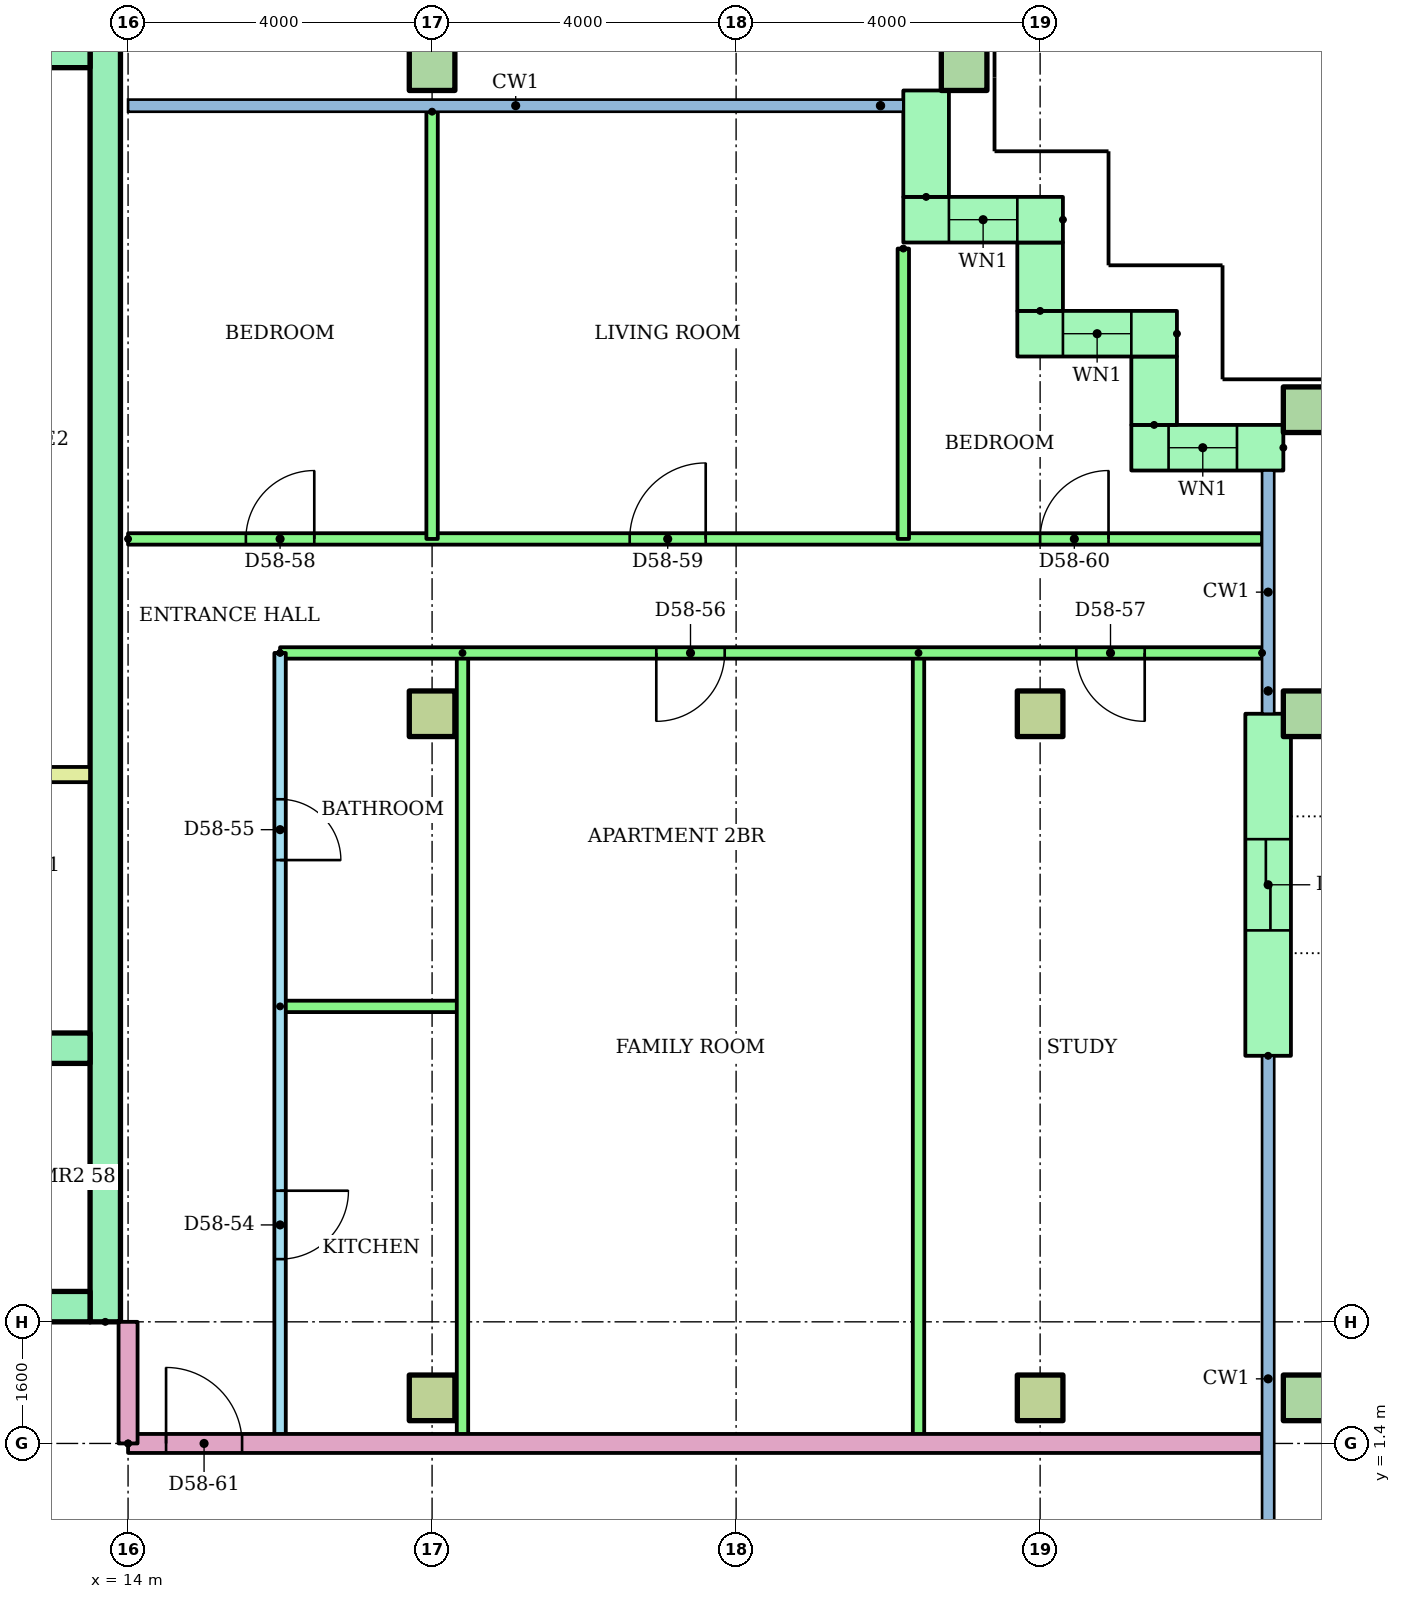
"""IFC4 building model, lengths in metres.
Left out: names, types, materials, properties, quantities, classifications, styles, units other than length and angle.
Written with IfcOpenShell. Run it as: python <this file> out.ifc"""

import sys

from ifc_helpers import new_model, si_unit, direction, frame, frame_2d, origin, origin_2d, place, context, subcontext, project, spatial, rectangle, hollow_rectangle, extrude, element, fill, save


model = new_model("IFC4")
c1 = context("Model", 3, precision=1e-05, world=origin(), true_north=direction((0.0, 1.0)))
c2 = subcontext(c1, "Body", "Model", "MODEL_VIEW")
j1 = project(units=[si_unit("LENGTHUNIT", "METRE"), si_unit("PLANEANGLEUNIT", "RADIAN")], contexts=[c1])
p1 = place(None, origin())
s1 = spatial("IfcSite", under=j1, at=p1, CompositionType="ELEMENT")
p2 = place(p1, origin())
s2 = spatial("IfcBuilding", under=s1, at=p2, CompositionType="ELEMENT")
p3 = place(p2, frame((0.0, 0.0, 223.6)))
s3 = spatial("IfcBuildingStorey", under=s2, at=p3, CompositionType="ELEMENT", Elevation=223.6)
for number, where in (
    (1, (18.0, 2.0, 0.0)),
    (2, (26.0, 2.0, 0.0)),
):
    element("IfcColumn", number, at=place(p3, frame(where)), inside=s3, PredefinedType="COLUMN", context=c2, shape_type="SweptSolid", body=[
        extrude(rectangle(XDim=0.6, YDim=0.6, at=origin_2d()), origin(), (0.0, 0.0, 1.0), 3.2),
    ])
p4 = place(p3, frame((29.5, 2.0, 0.0)))
e3 = element("IfcColumn", 3, at=p4, inside=s3, PredefinedType="COLUMN", context=c2, shape_type="SweptSolid", body=[
    extrude(hollow_rectangle(XDim=0.6, YDim=0.6, WallThickness=0.03, at=origin_2d()), origin(), (0.0, 0.0, 1.0), 3.2),
])
for number, where in (
    (4, (18.0, 11.0, 0.0)),
    (5, (26.0, 11.0, 0.0)),
):
    element("IfcColumn", number, at=place(p3, frame(where)), inside=s3, PredefinedType="COLUMN", context=c2, shape_type="SweptSolid", body=[
        extrude(rectangle(XDim=0.6, YDim=0.6, at=origin_2d()), origin(), (0.0, 0.0, 1.0), 3.2),
    ])
for number, where in (
    (6, (29.5, 11.0, 0.0)),
    (7, (29.5, 15.0, 0.0)),
    (8, (18.0, 19.5, 0.0)),
    (9, (25.0, 19.5, 0.0)),
):
    element("IfcColumn", number, at=place(p3, frame(where)), inside=s3, PredefinedType="COLUMN", context=c2, shape_type="SweptSolid", body=[
        extrude(hollow_rectangle(XDim=0.6, YDim=0.6, WallThickness=0.03, at=origin_2d()), origin(), (0.0, 0.0, 1.0), 3.2),
    ])
p5 = place(p3, frame((29.2, 14.5, 0.0), z_axis=(0.0, 0.0, 1.0), x_axis=(-1.0, 0.0, 0.0)))
e10 = element("IfcWall", 10, at=p5, inside=s3, PredefinedType="STANDARD", context=c2, shape_type="SweptSolid", body=[
    extrude(rectangle(XDim=2.0, YDim=0.6, at=frame_2d((1.0, 0.0))), origin(), (0.0, 0.0, 1.0), 2.92),
])
p6 = place(p5, frame((0.61, 0.0, 0.9)))
e11 = element("IfcOpeningElement", 11, at=p6, cuts=e10, PredefinedType="OPENING", context=c2, shape_type="SweptSolid", body=[
    extrude(rectangle(XDim=0.9, YDim=1.5, at=frame_2d((0.45, 0.75))), frame((0.0, 0.31, 0.0), z_axis=(0.0, -1.0, 0.0), x_axis=(1.0, 0.0, 0.0)), (0.0, 0.0, 1.0), 0.62),
])
p7 = place(p3, frame((27.5, 14.8, 0.0), z_axis=(0.0, 0.0, 1.0), x_axis=(0.0, 1.0, 0.0)))
e12 = element("IfcWall", 12, at=p7, inside=s3, PredefinedType="STANDARD", context=c2, shape_type="SweptSolid", body=[
    extrude(rectangle(XDim=0.9, YDim=0.6, at=frame_2d((0.45, 0.0))), origin(), (0.0, 0.0, 1.0), 2.92),
])
p8 = place(p3, frame((27.8, 16.0, 0.0), z_axis=(0.0, 0.0, 1.0), x_axis=(-1.0, 0.0, 0.0)))
e13 = element("IfcWall", 13, at=p8, inside=s3, PredefinedType="STANDARD", context=c2, shape_type="SweptSolid", body=[
    extrude(rectangle(XDim=2.1, YDim=0.6, at=frame_2d((1.05, 0.0))), origin(), (0.0, 0.0, 1.0), 2.92),
])
p9 = place(p8, frame((0.6, 0.0, 0.9)))
e14 = element("IfcOpeningElement", 14, at=p9, cuts=e13, PredefinedType="OPENING", context=c2, shape_type="SweptSolid", body=[
    extrude(rectangle(XDim=0.9, YDim=1.5, at=frame_2d((0.45, 0.75))), frame((0.0, 0.31, 0.0), z_axis=(0.0, -1.0, 0.0), x_axis=(1.0, 0.0, 0.0)), (0.0, 0.0, 1.0), 0.62),
])
p10 = place(p3, frame((26.0, 16.3, 0.0), z_axis=(0.0, 0.0, 1.0), x_axis=(0.0, 1.0, 0.0)))
e15 = element("IfcWall", 15, at=p10, inside=s3, PredefinedType="STANDARD", context=c2, shape_type="SweptSolid", body=[
    extrude(rectangle(XDim=0.9, YDim=0.6, at=frame_2d((0.45, 0.0))), origin(), (0.0, 0.0, 1.0), 2.92),
])
p11 = place(p3, frame((26.3, 17.5, 0.0), z_axis=(0.0, 0.0, 1.0), x_axis=(-1.0, 0.0, 0.0)))
e16 = element("IfcWall", 16, at=p11, inside=s3, PredefinedType="STANDARD", context=c2, shape_type="SweptSolid", body=[
    extrude(rectangle(XDim=2.1, YDim=0.6, at=frame_2d((1.05, 0.0))), origin(), (0.0, 0.0, 1.0), 2.92),
])
p12 = place(p11, frame((0.6, 0.0, 0.9)))
e17 = element("IfcOpeningElement", 17, at=p12, cuts=e16, PredefinedType="OPENING", context=c2, shape_type="SweptSolid", body=[
    extrude(rectangle(XDim=0.9, YDim=1.5, at=frame_2d((0.45, 0.75))), frame((0.0, 0.31, 0.0), z_axis=(0.0, -1.0, 0.0), x_axis=(1.0, 0.0, 0.0)), (0.0, 0.0, 1.0), 0.62),
])
p13 = place(p3, frame((24.5, 17.8, 0.0), z_axis=(0.0, 0.0, 1.0), x_axis=(0.0, 1.0, 0.0)))
e18 = element("IfcWall", 18, at=p13, inside=s3, PredefinedType="STANDARD", context=c2, shape_type="SweptSolid", body=[
    extrude(rectangle(XDim=1.4, YDim=0.6, at=frame_2d((0.7, 0.0))), origin(), (0.0, 0.0, 1.0), 2.92),
])
p14 = place(p3, frame((29.0, 6.5, 0.0), z_axis=(0.0, 0.0, 1.0), x_axis=(0.0, 1.0, 0.0)))
e19 = element("IfcWall", 19, at=p14, inside=s3, PredefinedType="STANDARD", context=c2, shape_type="SweptSolid", body=[
    extrude(rectangle(XDim=4.5, YDim=0.6, at=frame_2d((2.25, 0.0))), origin(), (0.0, 0.0, 1.0), 2.92),
])
p15 = place(p14, frame((1.65, 0.0, 0.0)))
e20 = element("IfcOpeningElement", 20, at=p15, cuts=e19, PredefinedType="OPENING", context=c2, shape_type="SweptSolid", body=[
    extrude(rectangle(XDim=1.2, YDim=2.1, at=frame_2d((0.6, 1.05))), frame((0.0, 0.31, 0.0), z_axis=(0.0, -1.0, 0.0), x_axis=(1.0, 0.0, 0.0)), (0.0, 0.0, 1.0), 0.62),
])
p16 = place(p3, frame((13.7, 3.0, 0.0), z_axis=(0.0, 0.0, 1.0), x_axis=(0.0, 1.0, 0.0)))
e21 = element("IfcWall", 21, at=p16, inside=s3, PredefinedType="SHEAR", context=c2, shape_type="SweptSolid", body=[
    extrude(rectangle(XDim=17.0, YDim=0.4, at=frame_2d((8.5, 0.0))), origin(), (0.0, 0.0, 1.0), 2.92),
])
p17 = place(p3, frame((-13.5, 19.7, 0.0)))
e22 = element("IfcWall", 22, at=p17, inside=s3, PredefinedType="SHEAR", context=c2, shape_type="SweptSolid", body=[
    extrude(rectangle(XDim=27.0, YDim=0.4, at=frame_2d((13.5, 0.0))), origin(), (0.0, 0.0, 1.0), 2.92),
])
p18 = place(p3, frame((-13.5, 3.2, 0.0)))
e23 = element("IfcWall", 23, at=p18, inside=s3, PredefinedType="SHEAR", context=c2, shape_type="SweptSolid", body=[
    extrude(rectangle(XDim=27.0, YDim=0.4, at=frame_2d((13.5, 0.0))), origin(), (0.0, 0.0, 1.0), 2.92),
])
p19 = place(p18, frame((22.083, 0.0, 0.0)))
e24 = element("IfcOpeningElement", 24, at=p19, cuts=e23, PredefinedType="OPENING", context=c2, shape_type="SweptSolid", body=[
    extrude(rectangle(XDim=1.1, YDim=2.1, at=frame_2d((0.55, 1.05))), frame((0.0, 0.21, 0.0), z_axis=(0.0, -1.0, 0.0), x_axis=(1.0, 0.0, 0.0)), (0.0, 0.0, 1.0), 0.42),
])
p20 = place(p18, frame((25.128, 0.0, 0.0)))
e25 = element("IfcOpeningElement", 25, at=p20, cuts=e23, PredefinedType="OPENING", context=c2, shape_type="SweptSolid", body=[
    extrude(rectangle(XDim=1.1, YDim=2.1, at=frame_2d((0.55, 1.05))), frame((0.0, 0.21, 0.0), z_axis=(0.0, -1.0, 0.0), x_axis=(1.0, 0.0, 0.0)), (0.0, 0.0, 1.0), 0.42),
])
p21 = place(p18, frame((12.6, 0.0, 0.0)))
e26 = element("IfcOpeningElement", 26, at=p21, cuts=e23, PredefinedType="OPENING", context=c2, shape_type="SweptSolid", body=[
    extrude(rectangle(XDim=1.8, YDim=2.1, at=frame_2d((0.9, 1.05))), frame((0.0, 0.21, 0.0), z_axis=(0.0, -1.0, 0.0), x_axis=(1.0, 0.0, 0.0)), (0.0, 0.0, 1.0), 0.42),
])
p22 = place(p3, frame((1.522, 6.6, 0.0)))
e27 = element("IfcWall", 27, at=p22, inside=s3, PredefinedType="SHEAR", context=c2, shape_type="SweptSolid", body=[
    extrude(rectangle(XDim=11.978, YDim=0.4, at=frame_2d((5.989, 0.0))), origin(), (0.0, 0.0, 1.0), 2.92),
])
p23 = place(p22, frame((1.022, 0.0, 0.0)))
e28 = element("IfcOpeningElement", 28, at=p23, cuts=e27, PredefinedType="OPENING", context=c2, shape_type="SweptSolid", body=[
    extrude(rectangle(XDim=1.0, YDim=2.1, at=frame_2d((0.5, 1.05))), frame((0.0, 0.21, 0.0), z_axis=(0.0, -1.0, 0.0), x_axis=(1.0, 0.0, 0.0)), (0.0, 0.0, 1.0), 0.42),
])
p24 = place(p22, frame((4.067, 0.0, 0.0)))
e29 = element("IfcOpeningElement", 29, at=p24, cuts=e27, PredefinedType="OPENING", context=c2, shape_type="SweptSolid", body=[
    extrude(rectangle(XDim=1.0, YDim=2.1, at=frame_2d((0.5, 1.05))), frame((0.0, 0.21, 0.0), z_axis=(0.0, -1.0, 0.0), x_axis=(1.0, 0.0, 0.0)), (0.0, 0.0, 1.0), 0.42),
])
p25 = place(p3, frame((9.6, 10.2, 0.0)))
e30 = element("IfcWall", 30, at=p25, inside=s3, PredefinedType="PARTITIONING", context=c2, shape_type="SweptSolid", body=[
    extrude(rectangle(XDim=3.9, YDim=0.2, at=frame_2d((1.95, 0.0))), origin(), (0.0, 0.0, 1.0), 2.92),
])
p26 = place(p3, frame((16.0, 11.8, 0.0), z_axis=(0.0, 0.0, 1.0), x_axis=(0.0, -1.0, 0.0)))
e31 = element("IfcWall", 31, at=p26, inside=s3, PredefinedType="PARTITIONING", context=c2, shape_type="SweptSolid", body=[
    extrude(rectangle(XDim=10.4, YDim=0.15, at=frame_2d((5.2, 0.0))), origin(), (0.0, 0.0, 1.0), 2.4),
])
p27 = place(p26, frame((7.075, 0.0, 0.0)))
e32 = element("IfcOpeningElement", 32, at=p27, cuts=e31, PredefinedType="OPENING", context=c2, shape_type="SweptSolid", body=[
    extrude(rectangle(XDim=0.9, YDim=2.1, at=frame_2d((0.45, 1.05))), frame((0.0, 0.085, 0.0), z_axis=(0.0, -1.0, 0.0), x_axis=(1.0, 0.0, 0.0)), (0.0, 0.0, 1.0), 0.17),
])
p28 = place(p26, frame((1.925, 0.0, 0.0)))
e33 = element("IfcOpeningElement", 33, at=p28, cuts=e31, PredefinedType="OPENING", context=c2, shape_type="SweptSolid", body=[
    extrude(rectangle(XDim=0.8, YDim=2.1, at=frame_2d((0.4, 1.05))), frame((0.0, 0.085, 0.0), z_axis=(0.0, -1.0, 0.0), x_axis=(1.0, 0.0, 0.0)), (0.0, 0.0, 1.0), 0.17),
])
p29 = place(p3, frame((16.0, 7.15, 0.0)))
e34 = element("IfcWall", 34, at=p29, inside=s3, PredefinedType="PARTITIONING", context=c2, shape_type="SweptSolid", body=[
    extrude(rectangle(XDim=2.4, YDim=0.15, at=frame_2d((1.2, 0.0))), origin(), (0.0, 0.0, 1.0), 2.4),
])
for number, where, z_axis, x_axis in (
    (35, (18.4, 11.8, 0.0), (0.0, 0.0, 1.0), (0.0, -1.0, 0.0)),
    (36, (24.4, 11.8, 0.0), (0.0, 0.0, 1.0), (0.0, -1.0, 0.0)),
):
    element("IfcWall", number, at=place(p3, frame(where, z_axis=z_axis, x_axis=x_axis)), inside=s3, PredefinedType="PARTITIONING", context=c2, shape_type="SweptSolid", body=[
        extrude(rectangle(XDim=10.4, YDim=0.15, at=frame_2d((5.2, 0.0))), origin(), (0.0, 0.0, 1.0), 2.4),
    ])
p30 = place(p3, frame((28.92, 11.8, 0.0), z_axis=(0.0, 0.0, 1.0), x_axis=(-1.0, 0.0, 0.0)))
e37 = element("IfcWall", 37, at=p30, inside=s3, PredefinedType="PARTITIONING", context=c2, shape_type="SweptSolid", body=[
    extrude(rectangle(XDim=12.92, YDim=0.15, at=frame_2d((6.46, 0.0))), origin(), (0.0, 0.0, 1.0), 2.4),
])
p31 = place(p30, frame((7.07, 0.0, 0.0)))
e38 = element("IfcOpeningElement", 38, at=p31, cuts=e37, PredefinedType="OPENING", context=c2, shape_type="SweptSolid", body=[
    extrude(rectangle(XDim=0.9, YDim=2.1, at=frame_2d((0.45, 1.05))), frame((0.0, 0.085, 0.0), z_axis=(0.0, -1.0, 0.0), x_axis=(1.0, 0.0, 0.0)), (0.0, 0.0, 1.0), 0.17),
])
p32 = place(p30, frame((1.544, 0.0, 0.0)))
e39 = element("IfcOpeningElement", 39, at=p32, cuts=e37, PredefinedType="OPENING", context=c2, shape_type="SweptSolid", body=[
    extrude(rectangle(XDim=0.9, YDim=2.1, at=frame_2d((0.45, 1.05))), frame((0.0, 0.085, 0.0), z_axis=(0.0, -1.0, 0.0), x_axis=(1.0, 0.0, 0.0)), (0.0, 0.0, 1.0), 0.17),
])
p33 = place(p3, frame((14.0, 13.3, 0.0)))
e40 = element("IfcWall", 40, at=p33, inside=s3, PredefinedType="PARTITIONING", context=c2, shape_type="SweptSolid", body=[
    extrude(rectangle(XDim=14.92, YDim=0.15, at=frame_2d((7.46, 0.0))), origin(), (0.0, 0.0, 1.0), 2.4),
])
p34 = place(p33, frame((1.55, 0.0, 0.0)))
e41 = element("IfcOpeningElement", 41, at=p34, cuts=e40, PredefinedType="OPENING", context=c2, shape_type="SweptSolid", body=[
    extrude(rectangle(XDim=0.9, YDim=2.1, at=frame_2d((0.45, 1.05))), frame((0.0, 0.085, 0.0), z_axis=(0.0, -1.0, 0.0), x_axis=(1.0, 0.0, 0.0)), (0.0, 0.0, 1.0), 0.17),
])
p35 = place(p33, frame((6.6, 0.0, 0.0)))
e42 = element("IfcOpeningElement", 42, at=p35, cuts=e40, PredefinedType="OPENING", context=c2, shape_type="SweptSolid", body=[
    extrude(rectangle(XDim=1.0, YDim=2.1, at=frame_2d((0.5, 1.05))), frame((0.0, 0.085, 0.0), z_axis=(0.0, -1.0, 0.0), x_axis=(1.0, 0.0, 0.0)), (0.0, 0.0, 1.0), 0.17),
])
p36 = place(p33, frame((12.0, 0.0, 0.0)))
e43 = element("IfcOpeningElement", 43, at=p36, cuts=e40, PredefinedType="OPENING", context=c2, shape_type="SweptSolid", body=[
    extrude(rectangle(XDim=0.9, YDim=2.1, at=frame_2d((0.45, 1.05))), frame((0.0, 0.085, 0.0), z_axis=(0.0, -1.0, 0.0), x_axis=(1.0, 0.0, 0.0)), (0.0, 0.0, 1.0), 0.17),
])
p37 = place(p3, frame((18.0, 18.921, 0.0), z_axis=(0.0, 0.0, 1.0), x_axis=(0.0, -1.0, 0.0)))
e44 = element("IfcWall", 44, at=p37, inside=s3, PredefinedType="PARTITIONING", context=c2, shape_type="SweptSolid", body=[
    extrude(rectangle(XDim=5.621, YDim=0.15, at=frame_2d((2.811, 0.0))), origin(), (0.0, 0.0, 1.0), 2.4),
])
p38 = place(p3, frame((24.2, 17.12, 0.0), z_axis=(0.0, 0.0, 1.0), x_axis=(0.0, -1.0, 0.0)))
e45 = element("IfcWall", 45, at=p38, inside=s3, PredefinedType="PARTITIONING", context=c2, shape_type="SweptSolid", body=[
    extrude(rectangle(XDim=3.82, YDim=0.15, at=frame_2d((1.91, 0.0))), origin(), (0.0, 0.0, 1.0), 2.4),
])
p39 = place(p3, frame((14.0, 1.4, 0.0)))
e46 = element("IfcWall", 46, at=p39, inside=s3, PredefinedType="PARTITIONING", context=c2, shape_type="SweptSolid", body=[
    extrude(rectangle(XDim=14.92, YDim=0.25, at=frame_2d((7.46, 0.0))), origin(), (0.0, 0.0, 1.0), 2.4),
])
p40 = place(p39, frame((0.5, 0.0, 0.0)))
e47 = element("IfcOpeningElement", 47, at=p40, cuts=e46, PredefinedType="OPENING", context=c2, shape_type="SweptSolid", body=[
    extrude(rectangle(XDim=1.0, YDim=2.1, at=frame_2d((0.5, 1.05))), frame((0.0, 0.135, 0.0), z_axis=(0.0, -1.0, 0.0), x_axis=(1.0, 0.0, 0.0)), (0.0, 0.0, 1.0), 0.27),
])
p41 = place(p3, frame((14.0, 1.4, 0.0), z_axis=(0.0, 0.0, 1.0), x_axis=(0.0, 1.0, 0.0)))
e48 = element("IfcWall", 48, at=p41, inside=s3, PredefinedType="PARTITIONING", context=c2, shape_type="SweptSolid", body=[
    extrude(rectangle(XDim=1.6, YDim=0.25, at=frame_2d((0.8, 0.0))), origin(), (0.0, 0.0, 1.0), 2.4),
])
p42 = place(p6, origin())
e49 = element("IfcWindow", 49, at=p42, inside=s3, PartitioningType="SINGLE_PANEL", PredefinedType="WINDOW", context=c2, shape_type="SweptSolid", body=[
    extrude(rectangle(XDim=0.9, YDim=1.5, at=frame_2d((0.45, 0.75))), frame((0.0, 0.03, 0.0), z_axis=(0.0, -1.0, 0.0), x_axis=(1.0, 0.0, 0.0)), (0.0, 0.0, 1.0), 0.06),
])
fill(e11, e49)
p43 = place(p9, origin())
e50 = element("IfcWindow", 50, at=p43, inside=s3, PartitioningType="SINGLE_PANEL", PredefinedType="WINDOW", context=c2, shape_type="SweptSolid", body=[
    extrude(rectangle(XDim=0.9, YDim=1.5, at=frame_2d((0.45, 0.75))), frame((0.0, 0.03, 0.0), z_axis=(0.0, -1.0, 0.0), x_axis=(1.0, 0.0, 0.0)), (0.0, 0.0, 1.0), 0.06),
])
fill(e14, e50)
p44 = place(p12, origin())
e51 = element("IfcWindow", 51, at=p44, inside=s3, PartitioningType="SINGLE_PANEL", PredefinedType="WINDOW", context=c2, shape_type="SweptSolid", body=[
    extrude(rectangle(XDim=0.9, YDim=1.5, at=frame_2d((0.45, 0.75))), frame((0.0, 0.03, 0.0), z_axis=(0.0, -1.0, 0.0), x_axis=(1.0, 0.0, 0.0)), (0.0, 0.0, 1.0), 0.06),
])
fill(e17, e51)
p45 = place(p27, origin())
e52 = element("IfcDoor", 52, at=p45, inside=s3, OperationType="SINGLE_SWING_LEFT", PredefinedType="DOOR", context=c2, shape_type="SweptSolid", body=[
    extrude(rectangle(XDim=0.9, YDim=2.1, at=frame_2d((0.45, 1.05))), frame((0.0, 0.025, 0.0), z_axis=(0.0, -1.0, 0.0), x_axis=(1.0, 0.0, 0.0)), (0.0, 0.0, 1.0), 0.05),
])
fill(e32, e52)
p46 = place(p28, origin())
e53 = element("IfcDoor", 53, at=p46, inside=s3, OperationType="SINGLE_SWING_RIGHT", PredefinedType="DOOR", context=c2, shape_type="SweptSolid", body=[
    extrude(rectangle(XDim=0.8, YDim=2.1, at=frame_2d((0.4, 1.05))), frame((0.0, 0.025, 0.0), z_axis=(0.0, -1.0, 0.0), x_axis=(1.0, 0.0, 0.0)), (0.0, 0.0, 1.0), 0.05),
])
fill(e33, e53)
p47 = place(p31, origin())
e54 = element("IfcDoor", 54, at=p47, inside=s3, OperationType="SINGLE_SWING_RIGHT", PredefinedType="DOOR", context=c2, shape_type="SweptSolid", body=[
    extrude(rectangle(XDim=0.9, YDim=2.1, at=frame_2d((0.45, 1.05))), frame((0.0, 0.025, 0.0), z_axis=(0.0, -1.0, 0.0), x_axis=(1.0, 0.0, 0.0)), (0.0, 0.0, 1.0), 0.05),
])
fill(e38, e54)
p48 = place(p32, origin())
e55 = element("IfcDoor", 55, at=p48, inside=s3, OperationType="SINGLE_SWING_LEFT", PredefinedType="DOOR", context=c2, shape_type="SweptSolid", body=[
    extrude(rectangle(XDim=0.9, YDim=2.1, at=frame_2d((0.45, 1.05))), frame((0.0, 0.025, 0.0), z_axis=(0.0, -1.0, 0.0), x_axis=(1.0, 0.0, 0.0)), (0.0, 0.0, 1.0), 0.05),
])
fill(e39, e55)
p49 = place(p34, origin())
e56 = element("IfcDoor", 56, at=p49, inside=s3, OperationType="SINGLE_SWING_RIGHT", PredefinedType="DOOR", context=c2, shape_type="SweptSolid", body=[
    extrude(rectangle(XDim=0.9, YDim=2.1, at=frame_2d((0.45, 1.05))), frame((0.0, 0.025, 0.0), z_axis=(0.0, -1.0, 0.0), x_axis=(1.0, 0.0, 0.0)), (0.0, 0.0, 1.0), 0.05),
])
fill(e41, e56)
p50 = place(p35, origin())
e57 = element("IfcDoor", 57, at=p50, inside=s3, OperationType="SINGLE_SWING_RIGHT", PredefinedType="DOOR", context=c2, shape_type="SweptSolid", body=[
    extrude(rectangle(XDim=1.0, YDim=2.1, at=frame_2d((0.5, 1.05))), frame((0.0, 0.025, 0.0), z_axis=(0.0, -1.0, 0.0), x_axis=(1.0, 0.0, 0.0)), (0.0, 0.0, 1.0), 0.05),
])
fill(e42, e57)
p51 = place(p36, origin())
e58 = element("IfcDoor", 58, at=p51, inside=s3, OperationType="SINGLE_SWING_RIGHT", PredefinedType="DOOR", context=c2, shape_type="SweptSolid", body=[
    extrude(rectangle(XDim=0.9, YDim=2.1, at=frame_2d((0.45, 1.05))), frame((0.0, 0.025, 0.0), z_axis=(0.0, -1.0, 0.0), x_axis=(1.0, 0.0, 0.0)), (0.0, 0.0, 1.0), 0.05),
])
fill(e43, e58)
p52 = place(p40, origin())
e59 = element("IfcDoor", 59, at=p52, inside=s3, OperationType="SINGLE_SWING_LEFT", PredefinedType="DOOR", context=c2, shape_type="SweptSolid", body=[
    extrude(rectangle(XDim=1.0, YDim=2.1, at=frame_2d((0.5, 1.05))), frame((0.0, 0.025, 0.0), z_axis=(0.0, -1.0, 0.0), x_axis=(1.0, 0.0, 0.0)), (0.0, 0.0, 1.0), 0.05),
])
fill(e47, e59)
p53 = place(p15, origin())
e60 = element("IfcDoor", 60, at=p53, inside=s3, OperationType="SLIDING_TO_LEFT", PredefinedType="DOOR", context=c2, shape_type="SweptSolid", body=[
    extrude(rectangle(XDim=1.2, YDim=2.1, at=frame_2d((0.6, 1.05))), frame((0.0, 0.025, 0.0), z_axis=(0.0, -1.0, 0.0), x_axis=(1.0, 0.0, 0.0)), (0.0, 0.0, 1.0), 0.05),
])
fill(e20, e60)
save(model, sys.argv[1])
